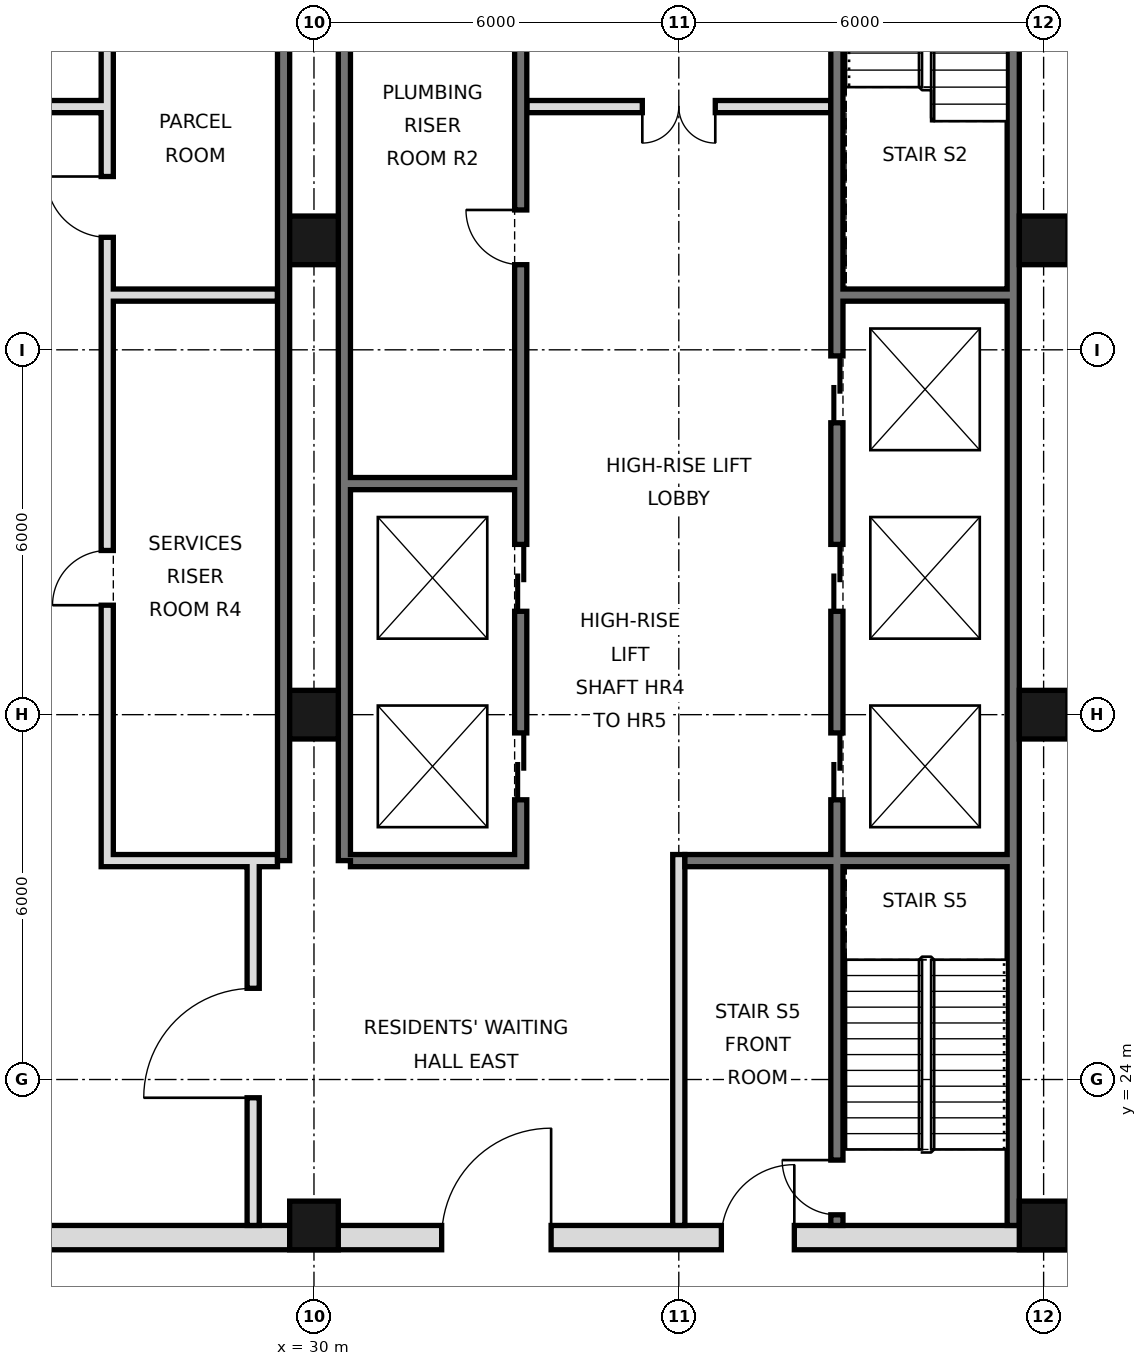
"""IFC4 building model, lengths in metres.
Left out: names, types, materials, properties, quantities, classifications, styles, units other than length and angle.
Written with IfcOpenShell. Run it as: python <this file> out.ifc"""

import sys

from ifc_helpers import new_model, si_unit, direction, frame, frame_2d, origin, origin_2d, place, context, subcontext, project, spatial, rectangle, hollow_rectangle, extrude, element, fill, save


model = new_model("IFC4")
c1 = context("Model", 3, precision=1e-05, world=origin(), true_north=direction((0.0, 1.0)))
c2 = subcontext(c1, "Body", "Model", "MODEL_VIEW")
j1 = project(units=[si_unit("LENGTHUNIT", "METRE"), si_unit("PLANEANGLEUNIT", "RADIAN")], contexts=[c1])
p1 = place(None, origin())
s1 = spatial("IfcSite", under=j1, at=p1, CompositionType="ELEMENT")
p2 = place(p1, origin())
s2 = spatial("IfcBuilding", under=s1, at=p2, CompositionType="ELEMENT")
p3 = place(p2, frame((0.0, 0.0, 229.8)))
s3 = spatial("IfcBuildingStorey", under=s2, at=p3, CompositionType="ELEMENT", Elevation=229.8)
for number, where, z_axis, x_axis in (
    (1, (30.0, 21.6, 0.0), (0.0, 0.0, 1.0), (1.0, 0.0, 0.0)),
    (2, (30.0, 30.0, 0.0), (0.0, 0.0, 1.0), (1.0, 0.0, 0.0)),
    (3, (30.0, 37.8, 0.0), (0.0, 0.0, 1.0), (1.0, 0.0, 0.0)),
    (4, (42.0, 21.6, 0.0), (0.0, 0.0, 1.0), (1.0, 0.0, 0.0)),
    (5, (42.0, 30.0, 0.0), (0.0, 0.0, 1.0), (1.0, 0.0, 0.0)),
    (6, (42.0, 37.8, 0.0), (0.0, 0.0, 1.0), (1.0, 0.0, 0.0)),
):
    element("IfcColumn", number, at=place(p3, frame(where, z_axis=z_axis, x_axis=x_axis)), inside=s3, PredefinedType="COLUMN", context=c2, shape_type="SweptSolid", body=[
        extrude(hollow_rectangle(XDim=0.8, YDim=0.8, WallThickness=0.04, at=origin_2d()), origin(), (0.0, 0.0, 1.0), 4.4),
    ])
p4 = place(p3, frame((41.5, 21.6, 0.0), z_axis=(0.0, 0.0, 1.0), x_axis=(0.0, 1.0, 0.0)))
e7 = element("IfcWall", 7, at=p4, inside=s3, PredefinedType="SOLIDWALL", context=c2, shape_type="SweptSolid", body=[
    extrude(rectangle(XDim=23.5, YDim=0.2, at=frame_2d((11.75, 0.0))), origin(), (0.0, 0.0, 1.0), 4.1),
])
for number, where, z_axis, x_axis in (
    (8, (29.5, 27.6, 0.0), (0.0, 0.0, 1.0), (0.0, 1.0, 0.0)),
    (9, (30.5, 27.6, 0.0), (0.0, 0.0, 1.0), (0.0, 1.0, 0.0)),
):
    element("IfcWall", number, at=place(p3, frame(where, z_axis=z_axis, x_axis=x_axis)), inside=s3, PredefinedType="SOLIDWALL", context=c2, shape_type="SweptSolid", body=[
        extrude(rectangle(XDim=17.5, YDim=0.2, at=frame_2d((8.75, 0.0))), origin(), (0.0, 0.0, 1.0), 4.1),
    ])
p5 = place(p3, frame((5.6, 21.4, 0.0), z_axis=(0.0, 0.0, 1.0), x_axis=(1.0, 0.0, 0.0)))
e10 = element("IfcWall", 10, at=p5, inside=s3, PredefinedType="SOLIDWALL", context=c2, shape_type="SweptSolid", body=[
    extrude(rectangle(XDim=36.8, YDim=0.4, at=frame_2d((18.4, 0.0))), origin(), (0.0, 0.0, 1.0), 4.1),
])
p6 = place(p5, frame((8.5, 0.0, 0.0)))
e11 = element("IfcOpeningElement", 11, at=p6, cuts=e10, PredefinedType="OPENING", context=c2, shape_type="SweptSolid", body=[
    extrude(rectangle(XDim=1.8, YDim=2.1, at=frame_2d((0.9, 1.05))), frame((0.0, 0.21, 0.0), z_axis=(0.0, -1.0, 0.0), x_axis=(1.0, 0.0, 0.0)), (0.0, 0.0, 1.0), 0.42),
])
p7 = place(p5, frame((17.5, 0.0, 0.0)))
e12 = element("IfcOpeningElement", 12, at=p7, cuts=e10, PredefinedType="OPENING", context=c2, shape_type="SweptSolid", body=[
    extrude(rectangle(XDim=1.8, YDim=2.1, at=frame_2d((0.9, 1.05))), frame((0.0, 0.21, 0.0), z_axis=(0.0, -1.0, 0.0), x_axis=(1.0, 0.0, 0.0)), (0.0, 0.0, 1.0), 0.42),
])
p8 = place(p5, frame((26.5, 0.0, 0.0)))
e13 = element("IfcOpeningElement", 13, at=p8, cuts=e10, PredefinedType="OPENING", context=c2, shape_type="SweptSolid", body=[
    extrude(rectangle(XDim=1.8, YDim=2.1, at=frame_2d((0.9, 1.05))), frame((0.0, 0.21, 0.0), z_axis=(0.0, -1.0, 0.0), x_axis=(1.0, 0.0, 0.0)), (0.0, 0.0, 1.0), 0.42),
])
p9 = place(p5, frame((4.5, 0.0, 0.0)))
e14 = element("IfcOpeningElement", 14, at=p9, cuts=e10, PredefinedType="OPENING", context=c2, shape_type="SweptSolid", body=[
    extrude(rectangle(XDim=1.2, YDim=2.1, at=frame_2d((0.6, 1.05))), frame((0.0, 0.21, 0.0), z_axis=(0.0, -1.0, 0.0), x_axis=(1.0, 0.0, 0.0)), (0.0, 0.0, 1.0), 0.42),
])
p10 = place(p5, frame((31.1, 0.0, 0.0)))
e15 = element("IfcOpeningElement", 15, at=p10, cuts=e10, PredefinedType="OPENING", context=c2, shape_type="SweptSolid", body=[
    extrude(rectangle(XDim=1.2, YDim=2.1, at=frame_2d((0.6, 1.05))), frame((0.0, 0.21, 0.0), z_axis=(0.0, -1.0, 0.0), x_axis=(1.0, 0.0, 0.0)), (0.0, 0.0, 1.0), 0.42),
])
p11 = place(p3, frame((29.0, 21.6, 0.0), z_axis=(0.0, 0.0, 1.0), x_axis=(0.0, 1.0, 0.0)))
e16 = element("IfcWall", 16, at=p11, inside=s3, PredefinedType="PARTITIONING", context=c2, shape_type="SweptSolid", body=[
    extrude(rectangle(XDim=6.0, YDim=0.2, at=frame_2d((3.0, 0.0))), origin(), (0.0, 0.0, 1.0), 4.1),
])
p12 = place(p11, frame((2.1, 0.0, 0.0)))
e17 = element("IfcOpeningElement", 17, at=p12, cuts=e16, PredefinedType="OPENING", context=c2, shape_type="SweptSolid", body=[
    extrude(rectangle(XDim=1.8, YDim=2.1, at=frame_2d((0.9, 1.05))), frame((0.0, 0.11, 0.0), z_axis=(0.0, -1.0, 0.0), x_axis=(1.0, 0.0, 0.0)), (0.0, 0.0, 1.0), 0.22),
])
p13 = place(p3, frame((26.6, 27.5, 0.0), z_axis=(0.0, 0.0, 1.0), x_axis=(0.0, 1.0, 0.0)))
e18 = element("IfcWall", 18, at=p13, inside=s3, PredefinedType="SOLIDWALL", context=c2, shape_type="SweptSolid", body=[
    extrude(rectangle(XDim=17.5, YDim=0.2, at=frame_2d((8.75, 0.0))), origin(), (0.0, 0.0, 1.0), 4.1),
])
p14 = place(p13, frame((4.3, 0.0, 0.0)))
e19 = element("IfcOpeningElement", 19, at=p14, cuts=e18, PredefinedType="OPENING", context=c2, shape_type="SweptSolid", body=[
    extrude(rectangle(XDim=0.9, YDim=2.1, at=frame_2d((0.45, 1.05))), frame((0.0, 0.11, 0.0), z_axis=(0.0, -1.0, 0.0), x_axis=(1.0, 0.0, 0.0)), (0.0, 0.0, 1.0), 0.22),
])
p15 = place(p13, frame((10.35, 0.0, 0.0)))
e20 = element("IfcOpeningElement", 20, at=p15, cuts=e18, PredefinedType="OPENING", context=c2, shape_type="SweptSolid", body=[
    extrude(rectangle(XDim=1.0, YDim=2.1, at=frame_2d((0.5, 1.05))), frame((0.0, 0.11, 0.0), z_axis=(0.0, -1.0, 0.0), x_axis=(1.0, 0.0, 0.0)), (0.0, 0.0, 1.0), 0.22),
])
p16 = place(p13, frame((15.475, 0.0, 0.0)))
e21 = element("IfcOpeningElement", 21, at=p16, cuts=e18, PredefinedType="OPENING", context=c2, shape_type="SweptSolid", body=[
    extrude(rectangle(XDim=1.0, YDim=2.1, at=frame_2d((0.5, 1.05))), frame((0.0, 0.11, 0.0), z_axis=(0.0, -1.0, 0.0), x_axis=(1.0, 0.0, 0.0)), (0.0, 0.0, 1.0), 0.22),
])
p17 = place(p3, frame((33.4, 27.5, 0.0), z_axis=(0.0, 0.0, 1.0), x_axis=(0.0, 1.0, 0.0)))
e22 = element("IfcWall", 22, at=p17, inside=s3, PredefinedType="SOLIDWALL", context=c2, shape_type="SweptSolid", body=[
    extrude(rectangle(XDim=17.5, YDim=0.2, at=frame_2d((8.75, 0.0))), origin(), (0.0, 0.0, 1.0), 4.1),
])
p18 = place(p17, frame((1.1, 0.0, 0.0)))
e23 = element("IfcOpeningElement", 23, at=p18, cuts=e22, PredefinedType="OPENING", context=c2, shape_type="SweptSolid", body=[
    extrude(rectangle(XDim=1.1, YDim=2.1, at=frame_2d((0.55, 1.05))), frame((0.0, 0.11, 0.0), z_axis=(0.0, -1.0, 0.0), x_axis=(1.0, 0.0, 0.0)), (0.0, 0.0, 1.0), 0.22),
])
p19 = place(p17, frame((4.2, 0.0, 0.0)))
e24 = element("IfcOpeningElement", 24, at=p19, cuts=e22, PredefinedType="OPENING", context=c2, shape_type="SweptSolid", body=[
    extrude(rectangle(XDim=1.1, YDim=2.1, at=frame_2d((0.55, 1.05))), frame((0.0, 0.11, 0.0), z_axis=(0.0, -1.0, 0.0), x_axis=(1.0, 0.0, 0.0)), (0.0, 0.0, 1.0), 0.22),
])
p20 = place(p17, frame((15.4, 0.0, 0.0)))
e25 = element("IfcOpeningElement", 25, at=p20, cuts=e22, PredefinedType="OPENING", context=c2, shape_type="SweptSolid", body=[
    extrude(rectangle(XDim=1.1, YDim=2.1, at=frame_2d((0.55, 1.05))), frame((0.0, 0.11, 0.0), z_axis=(0.0, -1.0, 0.0), x_axis=(1.0, 0.0, 0.0)), (0.0, 0.0, 1.0), 0.22),
])
p21 = place(p17, frame((9.9, 0.0, 0.0)))
e26 = element("IfcOpeningElement", 26, at=p21, cuts=e22, PredefinedType="OPENING", context=c2, shape_type="SweptSolid", body=[
    extrude(rectangle(XDim=0.9, YDim=2.1, at=frame_2d((0.45, 1.05))), frame((0.0, 0.11, 0.0), z_axis=(0.0, -1.0, 0.0), x_axis=(1.0, 0.0, 0.0)), (0.0, 0.0, 1.0), 0.22),
])
p22 = place(p3, frame((36.0, 21.6, 0.0), z_axis=(0.0, 0.0, 1.0), x_axis=(0.0, 1.0, 0.0)))
e27 = element("IfcWall", 27, at=p22, inside=s3, PredefinedType="PARTITIONING", context=c2, shape_type="SweptSolid", body=[
    extrude(rectangle(XDim=6.1, YDim=0.2, at=frame_2d((3.05, 0.0))), origin(), (0.0, 0.0, 1.0), 4.1),
])
p23 = place(p3, frame((38.6, 21.6, 0.0), z_axis=(0.0, 0.0, 1.0), x_axis=(0.0, 1.0, 0.0)))
e28 = element("IfcWall", 28, at=p23, inside=s3, PredefinedType="SOLIDWALL", context=c2, shape_type="SweptSolid", body=[
    extrude(rectangle(XDim=23.4, YDim=0.2, at=frame_2d((11.7, 0.0))), origin(), (0.0, 0.0, 1.0), 4.1),
])
p24 = place(p23, frame((7.0, 0.0, 0.0)))
e29 = element("IfcOpeningElement", 29, at=p24, cuts=e28, PredefinedType="OPENING", context=c2, shape_type="SweptSolid", body=[
    extrude(rectangle(XDim=1.1, YDim=2.1, at=frame_2d((0.55, 1.05))), frame((0.0, 0.11, 0.0), z_axis=(0.0, -1.0, 0.0), x_axis=(1.0, 0.0, 0.0)), (0.0, 0.0, 1.0), 0.22),
])
p25 = place(p23, frame((10.1, 0.0, 0.0)))
e30 = element("IfcOpeningElement", 30, at=p25, cuts=e28, PredefinedType="OPENING", context=c2, shape_type="SweptSolid", body=[
    extrude(rectangle(XDim=1.1, YDim=2.1, at=frame_2d((0.55, 1.05))), frame((0.0, 0.11, 0.0), z_axis=(0.0, -1.0, 0.0), x_axis=(1.0, 0.0, 0.0)), (0.0, 0.0, 1.0), 0.22),
])
p26 = place(p23, frame((13.2, 0.0, 0.0)))
e31 = element("IfcOpeningElement", 31, at=p26, cuts=e28, PredefinedType="OPENING", context=c2, shape_type="SweptSolid", body=[
    extrude(rectangle(XDim=1.1, YDim=2.1, at=frame_2d((0.55, 1.05))), frame((0.0, 0.11, 0.0), z_axis=(0.0, -1.0, 0.0), x_axis=(1.0, 0.0, 0.0)), (0.0, 0.0, 1.0), 0.22),
])
p27 = place(p23, frame((22.1, 0.0, 0.0)))
e32 = element("IfcOpeningElement", 32, at=p27, cuts=e28, PredefinedType="OPENING", context=c2, shape_type="SweptSolid", body=[
    extrude(rectangle(XDim=1.0, YDim=2.1, at=frame_2d((0.5, 1.05))), frame((0.0, 0.11, 0.0), z_axis=(0.0, -1.0, 0.0), x_axis=(1.0, 0.0, 0.0)), (0.0, 0.0, 1.0), 0.22),
])
p28 = place(p23, frame((0.175, 0.0, 0.0)))
e33 = element("IfcOpeningElement", 33, at=p28, cuts=e28, PredefinedType="OPENING", context=c2, shape_type="SweptSolid", body=[
    extrude(rectangle(XDim=0.9, YDim=2.1, at=frame_2d((0.45, 1.05))), frame((0.0, 0.11, 0.0), z_axis=(0.0, -1.0, 0.0), x_axis=(1.0, 0.0, 0.0)), (0.0, 0.0, 1.0), 0.22),
])
for number, where, z_axis, x_axis in (
    (34, (26.7, 27.6, 0.0), (0.0, 0.0, 1.0), (1.0, 0.0, 0.0)),
    (35, (30.6, 27.6, 0.0), (0.0, 0.0, 1.0), (1.0, 0.0, 0.0)),
):
    element("IfcWall", number, at=place(p3, frame(where, z_axis=z_axis, x_axis=x_axis)), inside=s3, PredefinedType="SOLIDWALL", context=c2, shape_type="SweptSolid", body=[
        extrude(rectangle(XDim=2.7, YDim=0.2, at=frame_2d((1.35, 0.0))), origin(), (0.0, 0.0, 1.0), 4.1),
    ])
p29 = place(p3, frame((36.1, 27.6, 0.0), z_axis=(0.0, 0.0, 1.0), x_axis=(1.0, 0.0, 0.0)))
e36 = element("IfcWall", 36, at=p29, inside=s3, PredefinedType="SOLIDWALL", context=c2, shape_type="SweptSolid", body=[
    extrude(rectangle(XDim=5.3, YDim=0.2, at=frame_2d((2.65, 0.0))), origin(), (0.0, 0.0, 1.0), 4.1),
])
for number, where, z_axis, x_axis in (
    (37, (30.6, 33.8, 0.0), (0.0, 0.0, 1.0), (1.0, 0.0, 0.0)),
    (38, (26.7, 36.9, 0.0), (0.0, 0.0, 1.0), (1.0, 0.0, 0.0)),
    (39, (38.7, 36.9, 0.0), (0.0, 0.0, 1.0), (1.0, 0.0, 0.0)),
):
    element("IfcWall", number, at=place(p3, frame(where, z_axis=z_axis, x_axis=x_axis)), inside=s3, PredefinedType="SOLIDWALL", context=c2, shape_type="SweptSolid", body=[
        extrude(rectangle(XDim=2.7, YDim=0.2, at=frame_2d((1.35, 0.0))), origin(), (0.0, 0.0, 1.0), 4.1),
    ])
p30 = place(p3, frame((21.5, 40.0, 0.0), z_axis=(0.0, 0.0, 1.0), x_axis=(1.0, 0.0, 0.0)))
e40 = element("IfcWall", 40, at=p30, inside=s3, PredefinedType="PARTITIONING", context=c2, shape_type="SweptSolid", body=[
    extrude(rectangle(XDim=5.0, YDim=0.2, at=frame_2d((2.5, 0.0))), origin(), (0.0, 0.0, 1.0), 4.1),
])
p31 = place(p30, frame((1.9, 0.0, 0.0)))
e41 = element("IfcOpeningElement", 41, at=p31, cuts=e40, PredefinedType="OPENING", context=c2, shape_type="SweptSolid", body=[
    extrude(rectangle(XDim=1.2, YDim=2.1, at=frame_2d((0.6, 1.05))), frame((0.0, 0.11, 0.0), z_axis=(0.0, -1.0, 0.0), x_axis=(1.0, 0.0, 0.0)), (0.0, 0.0, 1.0), 0.22),
])
p32 = place(p3, frame((33.5, 40.0, 0.0), z_axis=(0.0, 0.0, 1.0), x_axis=(1.0, 0.0, 0.0)))
e42 = element("IfcWall", 42, at=p32, inside=s3, PredefinedType="PARTITIONING", context=c2, shape_type="SweptSolid", body=[
    extrude(rectangle(XDim=5.0, YDim=0.2, at=frame_2d((2.5, 0.0))), origin(), (0.0, 0.0, 1.0), 4.1),
])
p33 = place(p32, frame((1.9, 0.0, 0.0)))
e43 = element("IfcOpeningElement", 43, at=p33, cuts=e42, PredefinedType="OPENING", context=c2, shape_type="SweptSolid", body=[
    extrude(rectangle(XDim=1.2, YDim=2.1, at=frame_2d((0.6, 1.05))), frame((0.0, 0.11, 0.0), z_axis=(0.0, -1.0, 0.0), x_axis=(1.0, 0.0, 0.0)), (0.0, 0.0, 1.0), 0.22),
])
p34 = place(p12, origin())
e44 = element("IfcDoor", 44, at=p34, inside=s3, OperationType="SINGLE_SWING_LEFT", PredefinedType="DOOR", context=c2, shape_type="SweptSolid", body=[
    extrude(rectangle(XDim=1.8, YDim=2.1, at=frame_2d((0.9, 1.05))), frame((0.0, 0.025, 0.0), z_axis=(0.0, -1.0, 0.0), x_axis=(1.0, 0.0, 0.0)), (0.0, 0.0, 1.0), 0.05),
])
fill(e17, e44)
p35 = place(p8, frame((1.8, 0.0, 0.0), z_axis=(0.0, 0.0, 1.0), x_axis=(-1.0, 0.0, 0.0)))
e45 = element("IfcDoor", 45, at=p35, inside=s3, OperationType="SINGLE_SWING_LEFT", PredefinedType="DOOR", context=c2, shape_type="SweptSolid", body=[
    extrude(rectangle(XDim=1.8, YDim=2.1, at=frame_2d((0.9, 1.05))), frame((0.0, 0.025, 0.0), z_axis=(0.0, -1.0, 0.0), x_axis=(1.0, 0.0, 0.0)), (0.0, 0.0, 1.0), 0.05),
])
fill(e13, e45)
p36 = place(p10, frame((1.2, 0.0, 0.0), z_axis=(0.0, 0.0, 1.0), x_axis=(-1.0, 0.0, 0.0)))
e46 = element("IfcDoor", 46, at=p36, inside=s3, OperationType="SINGLE_SWING_LEFT", PredefinedType="DOOR", context=c2, shape_type="SweptSolid", body=[
    extrude(rectangle(XDim=1.2, YDim=2.1, at=frame_2d((0.6, 1.05))), frame((0.0, 0.025, 0.0), z_axis=(0.0, -1.0, 0.0), x_axis=(1.0, 0.0, 0.0)), (0.0, 0.0, 1.0), 0.05),
])
fill(e15, e46)
p37 = place(p33, frame((1.2, 0.0, 0.0), z_axis=(0.0, 0.0, 1.0), x_axis=(-1.0, 0.0, 0.0)))
e47 = element("IfcDoor", 47, at=p37, inside=s3, OperationType="DOUBLE_DOOR_SINGLE_SWING", PredefinedType="DOOR", context=c2, shape_type="SweptSolid", body=[
    extrude(rectangle(XDim=1.2, YDim=2.1, at=frame_2d((0.6, 1.05))), frame((0.0, 0.025, 0.0), z_axis=(0.0, -1.0, 0.0), x_axis=(1.0, 0.0, 0.0)), (0.0, 0.0, 1.0), 0.05),
])
fill(e43, e47)
p38 = place(p24, origin())
e48 = element("IfcDoor", 48, at=p38, inside=s3, OperationType="DOUBLE_DOOR_SLIDING", PredefinedType="DOOR", context=c2, shape_type="SweptSolid", body=[
    extrude(rectangle(XDim=1.1, YDim=2.1, at=frame_2d((0.55, 1.05))), frame((0.0, 0.025, 0.0), z_axis=(0.0, -1.0, 0.0), x_axis=(1.0, 0.0, 0.0)), (0.0, 0.0, 1.0), 0.05),
])
fill(e29, e48)
p39 = place(p25, origin())
e49 = element("IfcDoor", 49, at=p39, inside=s3, OperationType="DOUBLE_DOOR_SLIDING", PredefinedType="DOOR", context=c2, shape_type="SweptSolid", body=[
    extrude(rectangle(XDim=1.1, YDim=2.1, at=frame_2d((0.55, 1.05))), frame((0.0, 0.025, 0.0), z_axis=(0.0, -1.0, 0.0), x_axis=(1.0, 0.0, 0.0)), (0.0, 0.0, 1.0), 0.05),
])
fill(e30, e49)
p40 = place(p26, origin())
e50 = element("IfcDoor", 50, at=p40, inside=s3, OperationType="DOUBLE_DOOR_SLIDING", PredefinedType="DOOR", context=c2, shape_type="SweptSolid", body=[
    extrude(rectangle(XDim=1.1, YDim=2.1, at=frame_2d((0.55, 1.05))), frame((0.0, 0.025, 0.0), z_axis=(0.0, -1.0, 0.0), x_axis=(1.0, 0.0, 0.0)), (0.0, 0.0, 1.0), 0.05),
])
fill(e31, e50)
p41 = place(p18, origin())
e51 = element("IfcDoor", 51, at=p41, inside=s3, OperationType="DOUBLE_DOOR_SLIDING", PredefinedType="DOOR", context=c2, shape_type="SweptSolid", body=[
    extrude(rectangle(XDim=1.1, YDim=2.1, at=frame_2d((0.55, 1.05))), frame((0.0, 0.025, 0.0), z_axis=(0.0, -1.0, 0.0), x_axis=(1.0, 0.0, 0.0)), (0.0, 0.0, 1.0), 0.05),
])
fill(e23, e51)
p42 = place(p19, origin())
e52 = element("IfcDoor", 52, at=p42, inside=s3, OperationType="DOUBLE_DOOR_SLIDING", PredefinedType="DOOR", context=c2, shape_type="SweptSolid", body=[
    extrude(rectangle(XDim=1.1, YDim=2.1, at=frame_2d((0.55, 1.05))), frame((0.0, 0.025, 0.0), z_axis=(0.0, -1.0, 0.0), x_axis=(1.0, 0.0, 0.0)), (0.0, 0.0, 1.0), 0.05),
])
fill(e24, e52)
p43 = place(p28, frame((0.9, 0.0, 0.0), z_axis=(0.0, 0.0, 1.0), x_axis=(-1.0, 0.0, 0.0)))
e53 = element("IfcDoor", 53, at=p43, inside=s3, OperationType="SINGLE_SWING_LEFT", PredefinedType="DOOR", context=c2, shape_type="SweptSolid", body=[
    extrude(rectangle(XDim=0.9, YDim=2.1, at=frame_2d((0.45, 1.05))), frame((0.0, 0.025, 0.0), z_axis=(0.0, -1.0, 0.0), x_axis=(1.0, 0.0, 0.0)), (0.0, 0.0, 1.0), 0.05),
])
fill(e33, e53)
p44 = place(p21, frame((0.9, 0.0, 0.0), z_axis=(0.0, 0.0, 1.0), x_axis=(-1.0, 0.0, 0.0)))
e54 = element("IfcDoor", 54, at=p44, inside=s3, OperationType="SINGLE_SWING_LEFT", PredefinedType="DOOR", context=c2, shape_type="SweptSolid", body=[
    extrude(rectangle(XDim=0.9, YDim=2.1, at=frame_2d((0.45, 1.05))), frame((0.0, 0.025, 0.0), z_axis=(0.0, -1.0, 0.0), x_axis=(1.0, 0.0, 0.0)), (0.0, 0.0, 1.0), 0.05),
])
fill(e26, e54)
p45 = place(p14, origin())
e55 = element("IfcDoor", 55, at=p45, inside=s3, OperationType="SINGLE_SWING_LEFT", PredefinedType="DOOR", context=c2, shape_type="SweptSolid", body=[
    extrude(rectangle(XDim=0.9, YDim=2.1, at=frame_2d((0.45, 1.05))), frame((0.0, 0.025, 0.0), z_axis=(0.0, -1.0, 0.0), x_axis=(1.0, 0.0, 0.0)), (0.0, 0.0, 1.0), 0.05),
])
fill(e19, e55)
p46 = place(p15, frame((1.0, 0.0, 0.0), z_axis=(0.0, 0.0, 1.0), x_axis=(-1.0, 0.0, 0.0)))
e56 = element("IfcDoor", 56, at=p46, inside=s3, OperationType="SINGLE_SWING_LEFT", PredefinedType="DOOR", context=c2, shape_type="SweptSolid", body=[
    extrude(rectangle(XDim=1.0, YDim=2.1, at=frame_2d((0.5, 1.05))), frame((0.0, 0.025, 0.0), z_axis=(0.0, -1.0, 0.0), x_axis=(1.0, 0.0, 0.0)), (0.0, 0.0, 1.0), 0.05),
])
fill(e20, e56)
save(model, sys.argv[1])
